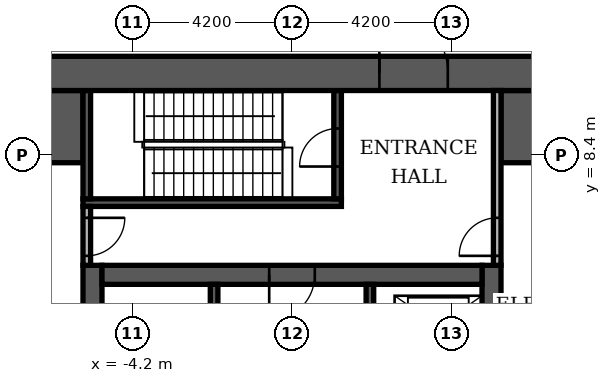
"""IFC4 building model, lengths in metres.
Left out: names, types, materials, properties, quantities, classifications, styles, units other than length and angle.
Written with IfcOpenShell. Run it as: python <this file> out.ifc"""

import sys

from ifc_helpers import new_model, si_unit, direction, frame, frame_2d, origin, place, context, subcontext, project, spatial, rectangle, extrude, element, fill, save


model = new_model("IFC4")
c1 = context("Model", 3, precision=1e-05, world=origin(), true_north=direction((0.0, 1.0)))
c2 = subcontext(c1, "Body", "Model", "MODEL_VIEW")
j1 = project(units=[si_unit("LENGTHUNIT", "METRE"), si_unit("PLANEANGLEUNIT", "RADIAN")], contexts=[c1])
p1 = place(None, origin())
s1 = spatial("IfcSite", under=j1, at=p1, CompositionType="ELEMENT")
p2 = place(p1, origin())
s2 = spatial("IfcBuilding", under=s1, at=p2, CompositionType="ELEMENT")
p3 = place(p2, frame((0.0, 0.0, 16.8)))
s3 = spatial("IfcBuildingStorey", under=s2, at=p3, CompositionType="ELEMENT", Elevation=16.8)
for number, where, z_axis, x_axis in (
    (1, (-5.25, -5.0, 0.0), (0.0, 0.0, 1.0), (0.0, 1.0, 0.0)),
    (2, (5.25, -5.0, 0.0), (0.0, 0.0, 1.0), (0.0, 1.0, 0.0)),
):
    element("IfcWall", number, at=place(p3, frame(where, z_axis=z_axis, x_axis=x_axis)), inside=s3, PredefinedType="SHEAR", context=c2, shape_type="SweptSolid", body=[
        extrude(rectangle(XDim=10.5, YDim=0.5, at=frame_2d((5.25, 0.0))), origin(), (0.0, 0.0, 1.0), 4.98),
    ])
p4 = place(p3, frame((-5.0, 5.25, 0.0), z_axis=(0.0, 0.0, 1.0), x_axis=(1.0, 0.0, 0.0)))
e3 = element("IfcWall", 3, at=p4, inside=s3, PredefinedType="SHEAR", context=c2, shape_type="SweptSolid", body=[
    extrude(rectangle(XDim=10.0, YDim=0.5, at=frame_2d((5.0, 0.0))), origin(), (0.0, 0.0, 1.0), 4.98),
])
p5 = place(p4, frame((4.4, 0.0, 0.0)))
e4 = element("IfcOpeningElement", 4, at=p5, cuts=e3, PredefinedType="OPENING", context=c2, shape_type="SweptSolid", body=[
    extrude(rectangle(XDim=1.2, YDim=2.1, at=frame_2d((0.6, 1.05))), frame((0.0, 0.26, 0.0), z_axis=(0.0, -1.0, 0.0), x_axis=(1.0, 0.0, 0.0)), (0.0, 0.0, 1.0), 0.52),
])
for number, where, z_axis, x_axis in (
    (5, (-10.1, 9.15, 0.0), (0.0, 0.0, 1.0), (1.0, 0.0, 0.0)),
    (6, (5.5, 9.15, 0.0), (0.0, 0.0, 1.0), (1.0, 0.0, 0.0)),
):
    element("IfcWall", number, at=place(p3, frame(where, z_axis=z_axis, x_axis=x_axis)), inside=s3, PredefinedType="SHEAR", context=c2, shape_type="SweptSolid", body=[
        extrude(rectangle(XDim=4.6, YDim=1.9, at=frame_2d((2.3, 0.0))), origin(), (0.0, 0.0, 1.0), 4.98),
    ])
p6 = place(p3, frame((-2.05, -1.4, 0.0), z_axis=(0.0, 0.0, 1.0), x_axis=(0.0, 1.0, 0.0)))
e7 = element("IfcWall", 7, at=p6, inside=s3, PredefinedType="SHEAR", context=c2, shape_type="SweptSolid", body=[
    extrude(rectangle(XDim=6.4, YDim=0.2, at=frame_2d((3.2, 0.0))), origin(), (0.0, 0.0, 1.0), 4.98),
])
p7 = place(p6, frame((0.15, 0.0, 0.0)))
e8 = element("IfcOpeningElement", 8, at=p7, cuts=e7, PredefinedType="OPENING", context=c2, shape_type="SweptSolid", body=[
    extrude(rectangle(XDim=1.0, YDim=2.1, at=frame_2d((0.5, 1.05))), frame((0.0, 0.11, 0.0), z_axis=(0.0, -1.0, 0.0), x_axis=(1.0, 0.0, 0.0)), (0.0, 0.0, 1.0), 0.22),
])
p8 = place(p3, frame((-5.5, 7.15, 0.0), z_axis=(0.0, 0.0, 1.0), x_axis=(1.0, 0.0, 0.0)))
e9 = element("IfcWall", 9, at=p8, inside=s3, PredefinedType="SHEAR", context=c2, shape_type="SweptSolid", body=[
    extrude(rectangle(XDim=6.8, YDim=0.2, at=frame_2d((3.4, 0.0))), origin(), (0.0, 0.0, 1.0), 4.98),
])
p9 = place(p3, frame((-5.4, 7.25, 0.0), z_axis=(0.0, 0.0, 1.0), x_axis=(0.0, 1.0, 0.0)))
e10 = element("IfcWall", 10, at=p9, inside=s3, PredefinedType="SHEAR", context=c2, shape_type="SweptSolid", body=[
    extrude(rectangle(XDim=2.85, YDim=0.2, at=frame_2d((1.425, 0.0))), origin(), (0.0, 0.0, 1.0), 4.98),
])
p10 = place(p3, frame((1.2, 7.25, 0.0), z_axis=(0.0, 0.0, 1.0), x_axis=(0.0, 1.0, 0.0)))
e11 = element("IfcWall", 11, at=p10, inside=s3, PredefinedType="SHEAR", context=c2, shape_type="SweptSolid", body=[
    extrude(rectangle(XDim=2.85, YDim=0.2, at=frame_2d((1.425, 0.0))), origin(), (0.0, 0.0, 1.0), 4.98),
])
p11 = place(p10, frame((0.85, 0.0, 0.0)))
e12 = element("IfcOpeningElement", 12, at=p11, cuts=e11, PredefinedType="OPENING", context=c2, shape_type="SweptSolid", body=[
    extrude(rectangle(XDim=1.0, YDim=2.1, at=frame_2d((0.5, 1.05))), frame((0.0, 0.11, 0.0), z_axis=(0.0, -1.0, 0.0), x_axis=(1.0, 0.0, 0.0)), (0.0, 0.0, 1.0), 0.22),
])
p12 = place(p3, frame((2.05, 1.6, 0.0), z_axis=(0.0, 0.0, 1.0), x_axis=(0.0, 1.0, 0.0)))
e13 = element("IfcWall", 13, at=p12, inside=s3, PredefinedType="SHEAR", context=c2, shape_type="SweptSolid", body=[
    extrude(rectangle(XDim=3.4, YDim=0.2, at=frame_2d((1.7, 0.0))), origin(), (0.0, 0.0, 1.0), 4.98),
])
p13 = place(p12, frame((1.75, 0.0, 0.0)))
e14 = element("IfcOpeningElement", 14, at=p13, cuts=e13, PredefinedType="OPENING", context=c2, shape_type="SweptSolid", body=[
    extrude(rectangle(XDim=1.1, YDim=2.1, at=frame_2d((0.55, 1.05))), frame((0.0, 0.11, 0.0), z_axis=(0.0, -1.0, 0.0), x_axis=(1.0, 0.0, 0.0)), (0.0, 0.0, 1.0), 0.22),
])
p14 = place(p12, frame((0.15, 0.0, 0.0)))
e15 = element("IfcOpeningElement", 15, at=p14, cuts=e13, PredefinedType="OPENING", context=c2, shape_type="SweptSolid", body=[
    extrude(rectangle(XDim=0.8, YDim=2.1, at=frame_2d((0.4, 1.05))), frame((0.0, 0.11, 0.0), z_axis=(0.0, -1.0, 0.0), x_axis=(1.0, 0.0, 0.0)), (0.0, 0.0, 1.0), 0.22),
])
p15 = place(p3, frame((-11.0, 10.55, 0.0), z_axis=(0.0, 0.0, 1.0), x_axis=(1.0, 0.0, 0.0)))
e16 = element("IfcWall", 16, at=p15, inside=s3, PredefinedType="SHEAR", context=c2, shape_type="SweptSolid", body=[
    extrude(rectangle(XDim=22.0, YDim=0.9, at=frame_2d((11.0, 0.0))), origin(), (0.0, 0.0, 1.0), 4.98),
])
p16 = place(p15, frame((13.3, 0.0, 0.0)))
e17 = element("IfcOpeningElement", 17, at=p16, cuts=e16, PredefinedType="OPENING", context=c2, shape_type="SweptSolid", body=[
    extrude(rectangle(XDim=1.8, YDim=2.2, at=frame_2d((0.9, 1.1))), frame((0.0, 0.46, 0.0), z_axis=(0.0, -1.0, 0.0), x_axis=(1.0, 0.0, 0.0)), (0.0, 0.0, 1.0), 0.92),
])
p17 = place(p3, frame((-5.4, 5.5, 0.0), z_axis=(0.0, 0.0, 1.0), x_axis=(0.0, 1.0, 0.0)))
e18 = element("IfcWall", 18, at=p17, inside=s3, PredefinedType="PARTITIONING", context=c2, shape_type="SweptSolid", body=[
    extrude(rectangle(XDim=1.55, YDim=0.2, at=frame_2d((0.775, 0.0))), origin(), (0.0, 0.0, 1.0), 4.98),
])
p18 = place(p17, frame((0.25, 0.0, 0.0)))
e19 = element("IfcOpeningElement", 19, at=p18, cuts=e18, PredefinedType="OPENING", context=c2, shape_type="SweptSolid", body=[
    extrude(rectangle(XDim=1.0, YDim=2.1, at=frame_2d((0.5, 1.05))), frame((0.0, 0.11, 0.0), z_axis=(0.0, -1.0, 0.0), x_axis=(1.0, 0.0, 0.0)), (0.0, 0.0, 1.0), 0.22),
])
p19 = place(p3, frame((5.4, 5.5, 0.0), z_axis=(0.0, 0.0, 1.0), x_axis=(0.0, 1.0, 0.0)))
e20 = element("IfcWall", 20, at=p19, inside=s3, PredefinedType="PARTITIONING", context=c2, shape_type="SweptSolid", body=[
    extrude(rectangle(XDim=4.6, YDim=0.2, at=frame_2d((2.3, 0.0))), origin(), (0.0, 0.0, 1.0), 4.98),
])
p20 = place(p19, frame((0.25, 0.0, 0.0)))
e21 = element("IfcOpeningElement", 21, at=p20, cuts=e20, PredefinedType="OPENING", context=c2, shape_type="SweptSolid", body=[
    extrude(rectangle(XDim=1.0, YDim=2.1, at=frame_2d((0.5, 1.05))), frame((0.0, 0.11, 0.0), z_axis=(0.0, -1.0, 0.0), x_axis=(1.0, 0.0, 0.0)), (0.0, 0.0, 1.0), 0.22),
])
p21 = place(p5, frame((1.2, 0.0, 0.0), z_axis=(0.0, 0.0, 1.0), x_axis=(-1.0, 0.0, 0.0)))
e22 = element("IfcDoor", 22, at=p21, inside=s3, OperationType="SINGLE_SWING_LEFT", PredefinedType="DOOR", context=c2, shape_type="SweptSolid", body=[
    extrude(rectangle(XDim=1.2, YDim=2.1, at=frame_2d((0.6, 1.05))), frame((0.0, 0.025, 0.0), z_axis=(0.0, -1.0, 0.0), x_axis=(1.0, 0.0, 0.0)), (0.0, 0.0, 1.0), 0.05),
])
fill(e4, e22)
p22 = place(p11, origin())
e23 = element("IfcDoor", 23, at=p22, inside=s3, OperationType="SINGLE_SWING_LEFT", PredefinedType="DOOR", context=c2, shape_type="SweptSolid", body=[
    extrude(rectangle(XDim=1.0, YDim=2.1, at=frame_2d((0.5, 1.05))), frame((0.0, 0.025, 0.0), z_axis=(0.0, -1.0, 0.0), x_axis=(1.0, 0.0, 0.0)), (0.0, 0.0, 1.0), 0.05),
])
fill(e12, e23)
p23 = place(p18, frame((1.0, 0.0, 0.0), z_axis=(0.0, 0.0, 1.0), x_axis=(-1.0, 0.0, 0.0)))
e24 = element("IfcDoor", 24, at=p23, inside=s3, OperationType="SINGLE_SWING_RIGHT", PredefinedType="DOOR", context=c2, shape_type="SweptSolid", body=[
    extrude(rectangle(XDim=1.0, YDim=2.1, at=frame_2d((0.5, 1.05))), frame((0.0, 0.025, 0.0), z_axis=(0.0, -1.0, 0.0), x_axis=(1.0, 0.0, 0.0)), (0.0, 0.0, 1.0), 0.05),
])
fill(e19, e24)
p24 = place(p20, origin())
e25 = element("IfcDoor", 25, at=p24, inside=s3, OperationType="SINGLE_SWING_LEFT", PredefinedType="DOOR", context=c2, shape_type="SweptSolid", body=[
    extrude(rectangle(XDim=1.0, YDim=2.1, at=frame_2d((0.5, 1.05))), frame((0.0, 0.025, 0.0), z_axis=(0.0, -1.0, 0.0), x_axis=(1.0, 0.0, 0.0)), (0.0, 0.0, 1.0), 0.05),
])
fill(e21, e25)
p25 = place(p16, origin())
e26 = element("IfcDoor", 26, at=p25, inside=s3, OperationType="DOUBLE_DOOR_SINGLE_SWING", PredefinedType="DOOR", context=c2, shape_type="SweptSolid", body=[
    extrude(rectangle(XDim=1.8, YDim=2.2, at=frame_2d((0.9, 1.1))), frame((0.0, 0.025, 0.0), z_axis=(0.0, -1.0, 0.0), x_axis=(1.0, 0.0, 0.0)), (0.0, 0.0, 1.0), 0.05),
])
fill(e17, e26)
save(model, sys.argv[1])
